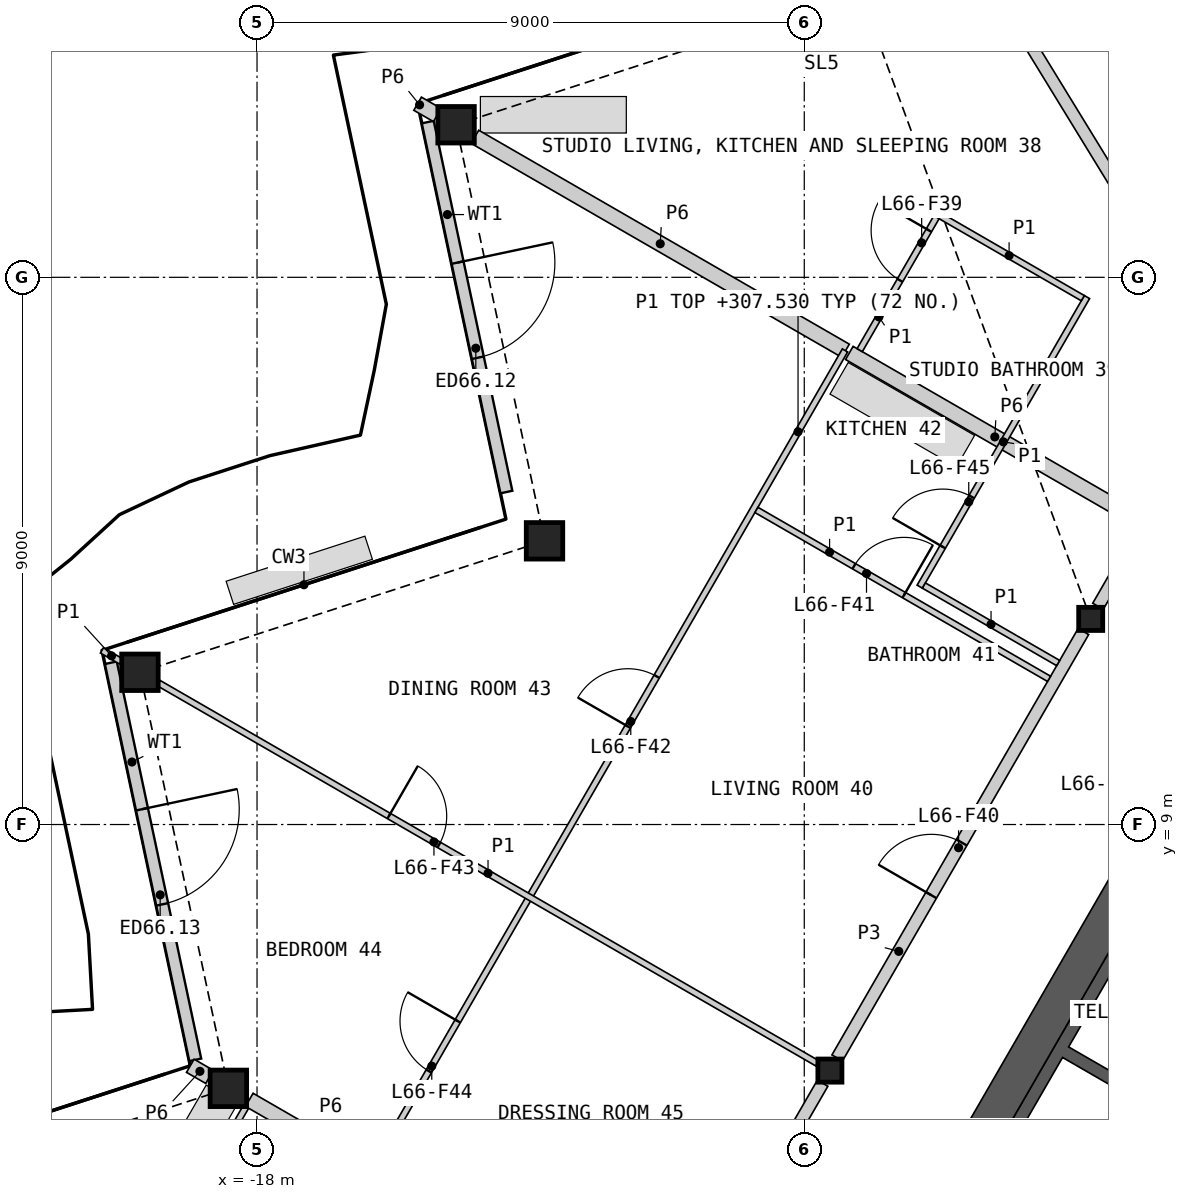
"""IFC4 building model, lengths in metres.
Left out: names, types, materials, properties, quantities, classifications, styles, units other than length and angle.
Written with IfcOpenShell. Run it as: python <this file> out.ifc"""

import sys

from ifc_helpers import new_model, si_unit, direction, frame, frame_2d, origin, origin_2d, place, context, subcontext, project, spatial, polyline, rectangle, hollow_rectangle, i_section, outline, extrude, element, fill, save


model = new_model("IFC4")
c1 = context("Model", 3, precision=1e-05, world=origin(), true_north=direction((0.0, 1.0)))
c2 = subcontext(c1, "Body", "Model", "MODEL_VIEW")
j1 = project(units=[si_unit("LENGTHUNIT", "METRE"), si_unit("PLANEANGLEUNIT", "RADIAN")], contexts=[c1])
p1 = place(None, origin())
s1 = spatial("IfcSite", under=j1, at=p1, CompositionType="ELEMENT")
p2 = place(p1, origin())
s2 = spatial("IfcBuilding", under=s1, at=p2, CompositionType="ELEMENT")
p3 = place(p2, frame((0.0, 0.0, 305.2)))
s3 = spatial("IfcBuildingStorey", under=s2, at=p3, CompositionType="ELEMENT", Elevation=305.2)
for number, where, z_axis, x_axis in (
    (1, (-14.727, 20.509, 0.0), (0.0, 0.0, 1.0), (1.0, 0.0, 0.0)),
    (2, (-13.272, 13.666, 0.0), (0.0, 0.0, 1.0), (1.0, 0.0, 0.0)),
    (3, (-19.926, 11.504, 0.0), (0.0, 0.0, 1.0), (1.0, 0.0, 0.0)),
    (4, (-18.471, 4.661, 0.0), (0.0, 0.0, 1.0), (1.0, 0.0, 0.0)),
):
    element("IfcColumn", number, at=place(p3, frame(where, z_axis=z_axis, x_axis=x_axis)), inside=s3, PredefinedType="COLUMN", context=c2, shape_type="SweptSolid", body=[
        extrude(hollow_rectangle(XDim=0.6, YDim=0.6, WallThickness=0.04, at=origin_2d()), origin(), (0.0, 0.0, 1.0), 3.4),
    ])
for number, where, z_axis, x_axis in (
    (5, (-4.289, 12.382, 0.0), (0.0, 0.0, 1.0), (1.0, 0.0, 0.0)),
    (6, (-8.578, 4.953, 0.0), (0.0, 0.0, 1.0), (1.0, 0.0, 0.0)),
):
    element("IfcColumn", number, at=place(p3, frame(where, z_axis=z_axis, x_axis=x_axis)), inside=s3, PredefinedType="COLUMN", context=c2, shape_type="SweptSolid", body=[
        extrude(i_section(OverallWidth=0.396, OverallDepth=0.381, WebThickness=0.019, FlangeThickness=0.03, at=origin_2d()), origin(), (0.0, 0.0, 1.0), 3.4),
    ])
p4 = place(p3, frame((-15.192, 20.553, 0.0), z_axis=(0.0, 0.0, 1.0), x_axis=(0.207920712138, -0.97814568315, 0.0)))
e7 = element("IfcWall", 7, at=p4, inside=s3, PredefinedType="SOLIDWALL", context=c2, shape_type="SweptSolid", body=[
    extrude(rectangle(XDim=6.221, YDim=0.2, at=frame_2d((3.11, 0.0))), origin(), (0.0, 0.0, 1.0), 2.488),
])
p5 = place(p4, frame((2.362, 0.0, 0.0)))
e8 = element("IfcOpeningElement", 8, at=p5, cuts=e7, PredefinedType="OPENING", context=c2, shape_type="SweptSolid", body=[
    extrude(rectangle(XDim=1.6, YDim=2.25, at=frame_2d((0.8, 1.125))), frame((0.0, 0.11, 0.0), z_axis=(0.0, -1.0, 0.0), x_axis=(1.0, 0.0, 0.0)), (0.0, 0.0, 1.0), 0.22),
])
p6 = place(p3, frame((-20.404, 11.661, 0.0), z_axis=(0.0, 0.0, 1.0), x_axis=(0.207893301034, -0.978151509422, 0.0)))
e9 = element("IfcWall", 9, at=p6, inside=s3, PredefinedType="SOLIDWALL", context=c2, shape_type="SweptSolid", body=[
    extrude(rectangle(XDim=6.677, YDim=0.2, at=frame_2d((3.339, 0.0))), origin(), (0.0, 0.0, 1.0), 2.488),
])
p7 = place(p6, frame((2.463, 0.0, 0.0)))
e10 = element("IfcOpeningElement", 10, at=p7, cuts=e9, PredefinedType="OPENING", context=c2, shape_type="SweptSolid", body=[
    extrude(rectangle(XDim=1.6, YDim=2.25, at=frame_2d((0.8, 1.125))), frame((0.0, 0.11, 0.0), z_axis=(0.0, -1.0, 0.0), x_axis=(1.0, 0.0, 0.0)), (0.0, 0.0, 1.0), 0.22),
])
p8 = place(p3, origin())
e11 = element("IfcWall", 11, at=p8, inside=s3, PredefinedType="SHEAR", context=c2, shape_type="SweptSolid", body=[
    extrude(outline(polyline([(-4.96, 0.208), (-7.131, 1.461), (-3.731, 7.35), (-1.561, 6.097), (-1.66, 5.924), (-3.652, 7.074), (-4.652, 5.342), (-2.66, 4.192), (-2.76, 4.019), (-4.752, 5.169), (-6.852, 1.531), (-4.861, 0.381), (-4.96, 0.208)])), origin(), (0.0, 0.0, 1.0), 3.1),
])
p9 = place(p3, frame((-1.631, 5.776, 0.0), z_axis=(0.0, 0.0, 1.0), x_axis=(-0.499992876559, -0.866029516466, 0.0)))
e12 = element("IfcWall", 12, at=p9, inside=s3, PredefinedType="SOLIDWALL", context=c2, shape_type="SweptSolid", body=[
    extrude(rectangle(XDim=6.486, YDim=0.2, at=frame_2d((3.243, 0.0))), origin(), (0.0, 0.0, 1.0), 3.1),
])
p10 = place(p9, frame((0.437, 0.0, 0.0)))
e13 = element("IfcOpeningElement", 13, at=p10, cuts=e12, PredefinedType="OPENING", context=c2, shape_type="SweptSolid", body=[
    extrude(rectangle(XDim=0.9, YDim=2.1, at=frame_2d((0.45, 1.05))), frame((0.0, 0.11, 0.0), z_axis=(0.0, -1.0, 0.0), x_axis=(1.0, 0.0, 0.0)), (0.0, 0.0, 1.0), 0.22),
])
p11 = place(p9, frame((3.737, 0.0, 0.0)))
e14 = element("IfcOpeningElement", 14, at=p11, cuts=e12, PredefinedType="OPENING", context=c2, shape_type="SweptSolid", body=[
    extrude(rectangle(XDim=0.9, YDim=2.1, at=frame_2d((0.45, 1.05))), frame((0.0, 0.11, 0.0), z_axis=(0.0, -1.0, 0.0), x_axis=(1.0, 0.0, 0.0)), (0.0, 0.0, 1.0), 0.22),
])
p12 = place(p3, frame((-3.639, 8.107, 0.0), z_axis=(0.0, 0.0, 1.0), x_axis=(-0.49999180351, -0.866030135978, 0.0)))
e15 = element("IfcWall", 15, at=p12, inside=s3, PredefinedType="SHEAR", context=c2, shape_type="SweptSolid", body=[
    extrude(rectangle(XDim=7.401, YDim=0.6, at=frame_2d((3.701, 0.0))), origin(), (0.0, 0.0, 1.0), 3.1),
])
p13 = place(p3, frame((-8.458, 5.16, 0.0), z_axis=(0.0, 0.0, 1.0), x_axis=(0.499984266882, 0.866034487114, 0.0)))
e16 = element("IfcWall", 16, at=p13, inside=s3, PredefinedType="PARTITIONING", context=c2, shape_type="SweptSolid", body=[
    extrude(rectangle(XDim=8.099, YDim=0.2, at=frame_2d((4.049, 0.0))), origin(), (0.0, 0.0, 1.0), 3.1),
])
p14 = place(p13, frame((3.093, 0.0, 0.0)))
e17 = element("IfcOpeningElement", 17, at=p14, cuts=e16, PredefinedType="OPENING", context=c2, shape_type="SweptSolid", body=[
    extrude(rectangle(XDim=1.0, YDim=2.1, at=frame_2d((0.5, 1.05))), frame((0.0, 0.11, 0.0), z_axis=(0.0, -1.0, 0.0), x_axis=(1.0, 0.0, 0.0)), (0.0, 0.0, 1.0), 0.22),
])
p15 = place(p3, frame((-12.748, -2.269, 0.0), z_axis=(0.0, 0.0, 1.0), x_axis=(0.499984266882, 0.866034487114, 0.0)))
e18 = element("IfcWall", 18, at=p15, inside=s3, PredefinedType="PARTITIONING", context=c2, shape_type="SweptSolid", body=[
    extrude(rectangle(XDim=8.099, YDim=0.2, at=frame_2d((4.049, 0.0))), origin(), (0.0, 0.0, 1.0), 3.1),
])
p16 = place(p15, frame((1.164, 0.0, 0.0)))
e19 = element("IfcOpeningElement", 19, at=p16, cuts=e18, PredefinedType="OPENING", context=c2, shape_type="SweptSolid", body=[
    extrude(rectangle(XDim=1.0, YDim=2.1, at=frame_2d((0.5, 1.05))), frame((0.0, 0.11, 0.0), z_axis=(0.0, -1.0, 0.0), x_axis=(1.0, 0.0, 0.0)), (0.0, 0.0, 1.0), 0.22),
])
p17 = place(p3, frame((-14.417, 20.311, 0.0), z_axis=(0.0, 0.0, 1.0), x_axis=(0.866027308682, -0.499996700606, 0.0)))
e20 = element("IfcWall", 20, at=p17, inside=s3, PredefinedType="PARTITIONING", context=c2, shape_type="SweptSolid", body=[
    extrude(rectangle(XDim=7.038, YDim=0.25, at=frame_2d((3.519, 0.0))), origin(), (0.0, 0.0, 1.0), 2.33),
])
p18 = place(p3, frame((-8.259, 16.756, 0.0), z_axis=(0.0, 0.0, 1.0), x_axis=(0.866023692682, -0.500002963705, 0.0)))
e21 = element("IfcWall", 21, at=p18, inside=s3, PredefinedType="PARTITIONING", context=c2, shape_type="SweptSolid", body=[
    extrude(rectangle(XDim=5.525, YDim=0.25, at=frame_2d((2.762, 0.0))), origin(), (0.0, 0.0, 1.0), 2.33),
])
p19 = place(p3, frame((-4.169, 12.59, 0.0), z_axis=(0.0, 0.0, 1.0), x_axis=(0.499950370306, 0.866054055606, 0.0)))
e22 = element("IfcWall", 22, at=p19, inside=s3, PredefinedType="PARTITIONING", context=c2, shape_type="SweptSolid", body=[
    extrude(rectangle(XDim=4.513, YDim=0.2, at=frame_2d((2.256, 0.0))), origin(), (0.0, 0.0, 1.0), 3.1),
])
p20 = place(p19, frame((2.459, 0.0, 0.0)))
e23 = element("IfcOpeningElement", 23, at=p20, cuts=e22, PredefinedType="OPENING", context=c2, shape_type="SweptSolid", body=[
    extrude(rectangle(XDim=1.0, YDim=2.1, at=frame_2d((0.5, 1.05))), frame((0.0, 0.11, 0.0), z_axis=(0.0, -1.0, 0.0), x_axis=(1.0, 0.0, 0.0)), (0.0, 0.0, 1.0), 0.22),
])
p21 = place(p3, frame((-18.127, 4.472, 0.0), z_axis=(0.0, 0.0, 1.0), x_axis=(0.866017755388, -0.500013247177, 0.0)))
e24 = element("IfcWall", 24, at=p21, inside=s3, PredefinedType="PARTITIONING", context=c2, shape_type="SweptSolid", body=[
    extrude(rectangle(XDim=2.447, YDim=0.25, at=frame_2d((1.223, 0.0))), origin(), (0.0, 0.0, 1.0), 2.33),
])
p22 = place(p3, frame((-15.359, 20.855, 0.0), z_axis=(0.0, 0.0, 1.0), x_axis=(0.865770353626, -0.500441499861, 0.0)))
e25 = element("IfcWall", 25, at=p22, inside=s3, PredefinedType="PARTITIONING", context=c2, shape_type="SweptSolid", body=[
    extrude(rectangle(XDim=0.372, YDim=0.25, at=frame_2d((0.186, 0.0))), origin(), (0.0, 0.0, 1.0), 2.33),
])
p23 = place(p3, frame((-19.097, 5.032, 0.0), z_axis=(0.0, 0.0, 1.0), x_axis=(0.86609656662, -0.499876722092, 0.0)))
e26 = element("IfcWall", 26, at=p23, inside=s3, PredefinedType="PARTITIONING", context=c2, shape_type="SweptSolid", body=[
    extrude(rectangle(XDim=0.365, YDim=0.25, at=frame_2d((0.183, 0.0))), origin(), (0.0, 0.0, 1.0), 2.33),
])
p24 = place(p3, frame((-9.802, 29.204, 0.0), z_axis=(0.0, 0.0, 1.0), x_axis=(0.522487920222, -0.852646687217, 0.0)))
e27 = element("IfcWall", 27, at=p24, inside=s3, PredefinedType="PARTITIONING", context=c2, shape_type="SweptSolid", body=[
    extrude(rectangle(XDim=14.904, YDim=0.2, at=frame_2d((7.452, 0.0))), origin(), (0.0, 0.0, 1.0), 2.33),
])
p25 = place(p3, frame((-16.054, 3.419, 0.0), z_axis=(0.0, 0.0, 1.0), x_axis=(0.499999256795, 0.866025832873, 0.0)))
e28 = element("IfcWall", 28, at=p25, inside=s3, PredefinedType="PARTITIONING", context=c2, shape_type="SweptSolid", body=[
    extrude(rectangle(XDim=15.448, YDim=0.1, at=frame_2d((7.724, 0.0))), origin(), (0.0, 0.0, 1.0), 2.33),
])
p26 = place(p25, frame((8.306, 0.0, 0.0)))
e29 = element("IfcOpeningElement", 29, at=p26, cuts=e28, PredefinedType="OPENING", context=c2, shape_type="SweptSolid", body=[
    extrude(rectangle(XDim=0.95, YDim=2.1, at=frame_2d((0.475, 1.05))), frame((0.0, 0.06, 0.0), z_axis=(0.0, -1.0, 0.0), x_axis=(1.0, 0.0, 0.0)), (0.0, 0.0, 1.0), 0.12),
])
p27 = place(p25, frame((1.76, 0.0, 0.0)))
e30 = element("IfcOpeningElement", 30, at=p27, cuts=e28, PredefinedType="OPENING", context=c2, shape_type="SweptSolid", body=[
    extrude(rectangle(XDim=0.95, YDim=2.1, at=frame_2d((0.475, 1.05))), frame((0.0, 0.06, 0.0), z_axis=(0.0, -1.0, 0.0), x_axis=(1.0, 0.0, 0.0)), (0.0, 0.0, 1.0), 0.12),
])
p28 = place(p3, frame((-19.615, 11.325, 0.0), z_axis=(0.0, 0.0, 1.0), x_axis=(0.86602139559, -0.500006942333, 0.0)))
e31 = element("IfcWall", 31, at=p28, inside=s3, PredefinedType="PARTITIONING", context=c2, shape_type="SweptSolid", body=[
    extrude(rectangle(XDim=12.505, YDim=0.1, at=frame_2d((6.252, 0.0))), origin(), (0.0, 0.0, 1.0), 2.33),
])
p29 = place(p28, frame((4.37, 0.0, 0.0)))
e32 = element("IfcOpeningElement", 32, at=p29, cuts=e31, PredefinedType="OPENING", context=c2, shape_type="SweptSolid", body=[
    extrude(rectangle(XDim=0.95, YDim=2.1, at=frame_2d((0.475, 1.05))), frame((0.0, 0.06, 0.0), z_axis=(0.0, -1.0, 0.0), x_axis=(1.0, 0.0, 0.0)), (0.0, 0.0, 1.0), 0.12),
])
p30 = place(p3, frame((-9.787, 14.174, 0.0), z_axis=(0.0, 0.0, 1.0), x_axis=(0.866031222068, -0.499989922303, 0.0)))
e33 = element("IfcWall", 33, at=p30, inside=s3, PredefinedType="PARTITIONING", context=c2, shape_type="SweptSolid", body=[
    extrude(rectangle(XDim=5.557, YDim=0.1, at=frame_2d((2.779, 0.0))), origin(), (0.0, 0.0, 1.0), 2.33),
])
p31 = place(p30, frame((1.853, 0.0, 0.0)))
e34 = element("IfcOpeningElement", 34, at=p31, cuts=e33, PredefinedType="OPENING", context=c2, shape_type="SweptSolid", body=[
    extrude(rectangle(XDim=0.95, YDim=2.1, at=frame_2d((0.475, 1.05))), frame((0.0, 0.06, 0.0), z_axis=(0.0, -1.0, 0.0), x_axis=(1.0, 0.0, 0.0)), (0.0, 0.0, 1.0), 0.12),
])
p32 = place(p3, frame((-7.101, 12.912, 0.0), z_axis=(0.0, 0.0, 1.0), x_axis=(0.499996545922, 0.866027397988, 0.0)))
e35 = element("IfcWall", 35, at=p32, inside=s3, PredefinedType="PARTITIONING", context=c2, shape_type="SweptSolid", body=[
    extrude(rectangle(XDim=5.5, YDim=0.1, at=frame_2d((2.75, 0.0))), origin(), (0.0, 0.0, 1.0), 2.33),
])
p33 = place(p32, frame((0.756, 0.0, 0.0)))
e36 = element("IfcOpeningElement", 36, at=p33, cuts=e35, PredefinedType="OPENING", context=c2, shape_type="SweptSolid", body=[
    extrude(rectangle(XDim=0.95, YDim=2.1, at=frame_2d((0.475, 1.05))), frame((0.0, 0.06, 0.0), z_axis=(0.0, -1.0, 0.0), x_axis=(1.0, 0.0, 0.0)), (0.0, 0.0, 1.0), 0.12),
])
p34 = place(p3, frame((-20.689, 0.014, 0.0), z_axis=(0.0, 0.0, 1.0), x_axis=(0.500003822013, 0.866023197133, 0.0)))
e37 = element("IfcWall", 37, at=p34, inside=s3, PredefinedType="PARTITIONING", context=c2, shape_type="SweptSolid", body=[
    extrude(rectangle(XDim=5.007, YDim=0.1, at=frame_2d((2.504, 0.0))), origin(), (0.0, 0.0, 1.0), 2.33),
])
p35 = place(p34, frame((0.86, 0.0, 0.0)))
e38 = element("IfcOpeningElement", 38, at=p35, cuts=e37, PredefinedType="OPENING", context=c2, shape_type="SweptSolid", body=[
    extrude(rectangle(XDim=0.95, YDim=2.1, at=frame_2d((0.475, 1.05))), frame((0.0, 0.06, 0.0), z_axis=(0.0, -1.0, 0.0), x_axis=(1.0, 0.0, 0.0)), (0.0, 0.0, 1.0), 0.12),
])
p36 = place(p3, frame((-6.844, 19.057, 0.0), z_axis=(0.0, 0.0, 1.0), x_axis=(0.866034573852, -0.49998411664, 0.0)))
e39 = element("IfcWall", 39, at=p36, inside=s3, PredefinedType="PARTITIONING", context=c2, shape_type="SweptSolid", body=[
    extrude(rectangle(XDim=2.8, YDim=0.1, at=frame_2d((1.4, 0.0))), origin(), (0.0, 0.0, 1.0), 2.33),
])
p37 = place(p3, frame((-7.032, 12.93, 0.0), z_axis=(0.0, 0.0, 1.0), x_axis=(0.866030925526, -0.499990435942, 0.0)))
e40 = element("IfcWall", 40, at=p37, inside=s3, PredefinedType="PARTITIONING", context=c2, shape_type="SweptSolid", body=[
    extrude(rectangle(XDim=2.55, YDim=0.1, at=frame_2d((1.275, 0.0))), origin(), (0.0, 0.0, 1.0), 2.33),
])
p38 = place(p3, frame((-8.088, 16.802, 0.0), z_axis=(0.0, 0.0, 1.0), x_axis=(0.499976333282, 0.866039067339, 0.0)))
e41 = element("IfcWall", 41, at=p38, inside=s3, PredefinedType="PARTITIONING", context=c2, shape_type="SweptSolid", body=[
    extrude(rectangle(XDim=2.525, YDim=0.1, at=frame_2d((1.262, 0.0))), origin(), (0.0, 0.0, 1.0), 2.33),
])
p39 = place(p38, frame((1.325, 0.0, 0.0)))
e42 = element("IfcOpeningElement", 42, at=p39, cuts=e41, PredefinedType="OPENING", context=c2, shape_type="SweptSolid", body=[
    extrude(rectangle(XDim=0.95, YDim=2.1, at=frame_2d((0.475, 1.05))), frame((0.0, 0.06, 0.0), z_axis=(0.0, -1.0, 0.0), x_axis=(1.0, 0.0, 0.0)), (0.0, 0.0, 1.0), 0.12),
])
p40 = place(p3, frame((-20.55, 11.865, 0.0), z_axis=(0.0, 0.0, 1.0), x_axis=(0.866039913117, -0.499974868256, 0.0)))
e43 = element("IfcWall", 43, at=p40, inside=s3, PredefinedType="PARTITIONING", context=c2, shape_type="SweptSolid", body=[
    extrude(rectangle(XDim=0.363, YDim=0.1, at=frame_2d((0.181, 0.0))), origin(), (0.0, 0.0, 1.0), 2.33),
])
p41 = place(p5, origin())
e44 = element("IfcDoor", 44, at=p41, inside=s3, OperationType="DOUBLE_DOOR_SINGLE_SWING", PredefinedType="DOOR", context=c2, shape_type="SweptSolid", body=[
    extrude(rectangle(XDim=1.6, YDim=2.25, at=frame_2d((0.8, 1.125))), frame((0.0, 0.025, 0.0), z_axis=(0.0, -1.0, 0.0), x_axis=(1.0, 0.0, 0.0)), (0.0, 0.0, 1.0), 0.05),
])
fill(e8, e44)
p42 = place(p7, origin())
e45 = element("IfcDoor", 45, at=p42, inside=s3, OperationType="DOUBLE_DOOR_SINGLE_SWING", PredefinedType="DOOR", context=c2, shape_type="SweptSolid", body=[
    extrude(rectangle(XDim=1.6, YDim=2.25, at=frame_2d((0.8, 1.125))), frame((0.0, 0.025, 0.0), z_axis=(0.0, -1.0, 0.0), x_axis=(1.0, 0.0, 0.0)), (0.0, 0.0, 1.0), 0.05),
])
fill(e10, e45)
p43 = place(p39, origin())
e46 = element("IfcDoor", 46, at=p43, inside=s3, OperationType="SINGLE_SWING_RIGHT", PredefinedType="DOOR", context=c2, shape_type="SweptSolid", body=[
    extrude(rectangle(XDim=0.95, YDim=2.1, at=frame_2d((0.475, 1.05))), frame((0.0, 0.025, 0.0), z_axis=(0.0, -1.0, 0.0), x_axis=(1.0, 0.0, 0.0)), (0.0, 0.0, 1.0), 0.05),
])
fill(e42, e46)
p44 = place(p14, origin())
e47 = element("IfcDoor", 47, at=p44, inside=s3, OperationType="SINGLE_SWING_LEFT", PredefinedType="DOOR", context=c2, shape_type="SweptSolid", body=[
    extrude(rectangle(XDim=1.0, YDim=2.1, at=frame_2d((0.5, 1.05))), frame((0.0, 0.025, 0.0), z_axis=(0.0, -1.0, 0.0), x_axis=(1.0, 0.0, 0.0)), (0.0, 0.0, 1.0), 0.05),
])
fill(e17, e47)
p45 = place(p31, origin())
e48 = element("IfcDoor", 48, at=p45, inside=s3, OperationType="SINGLE_SWING_RIGHT", PredefinedType="DOOR", context=c2, shape_type="SweptSolid", body=[
    extrude(rectangle(XDim=0.95, YDim=2.1, at=frame_2d((0.475, 1.05))), frame((0.0, 0.025, 0.0), z_axis=(0.0, -1.0, 0.0), x_axis=(1.0, 0.0, 0.0)), (0.0, 0.0, 1.0), 0.05),
])
fill(e34, e48)
p46 = place(p26, origin())
e49 = element("IfcDoor", 49, at=p46, inside=s3, OperationType="SINGLE_SWING_LEFT", PredefinedType="DOOR", context=c2, shape_type="SweptSolid", body=[
    extrude(rectangle(XDim=0.95, YDim=2.1, at=frame_2d((0.475, 1.05))), frame((0.0, 0.025, 0.0), z_axis=(0.0, -1.0, 0.0), x_axis=(1.0, 0.0, 0.0)), (0.0, 0.0, 1.0), 0.05),
])
fill(e29, e49)
p47 = place(p29, origin())
e50 = element("IfcDoor", 50, at=p47, inside=s3, OperationType="SINGLE_SWING_LEFT", PredefinedType="DOOR", context=c2, shape_type="SweptSolid", body=[
    extrude(rectangle(XDim=0.95, YDim=2.1, at=frame_2d((0.475, 1.05))), frame((0.0, 0.025, 0.0), z_axis=(0.0, -1.0, 0.0), x_axis=(1.0, 0.0, 0.0)), (0.0, 0.0, 1.0), 0.05),
])
fill(e32, e50)
p48 = place(p27, origin())
e51 = element("IfcDoor", 51, at=p48, inside=s3, OperationType="SINGLE_SWING_RIGHT", PredefinedType="DOOR", context=c2, shape_type="SweptSolid", body=[
    extrude(rectangle(XDim=0.95, YDim=2.1, at=frame_2d((0.475, 1.05))), frame((0.0, 0.025, 0.0), z_axis=(0.0, -1.0, 0.0), x_axis=(1.0, 0.0, 0.0)), (0.0, 0.0, 1.0), 0.05),
])
fill(e30, e51)
p49 = place(p33, origin())
e52 = element("IfcDoor", 52, at=p49, inside=s3, OperationType="SINGLE_SWING_LEFT", PredefinedType="DOOR", context=c2, shape_type="SweptSolid", body=[
    extrude(rectangle(XDim=0.95, YDim=2.1, at=frame_2d((0.475, 1.05))), frame((0.0, 0.025, 0.0), z_axis=(0.0, -1.0, 0.0), x_axis=(1.0, 0.0, 0.0)), (0.0, 0.0, 1.0), 0.05),
])
fill(e36, e52)
save(model, sys.argv[1])
